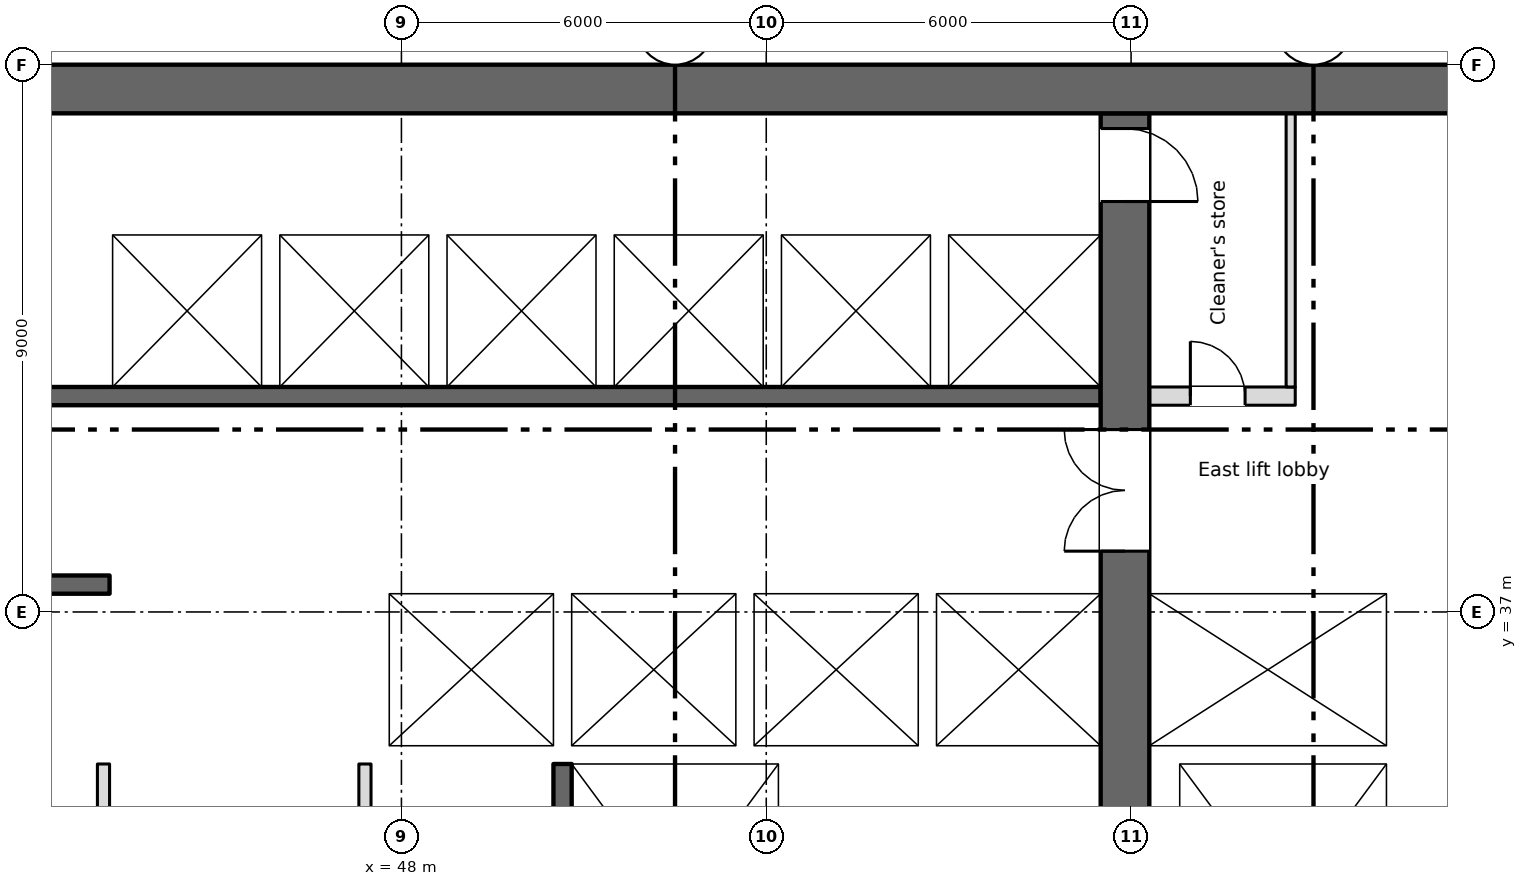
"""IFC4 building model, lengths in metres.
Left out: names, types, materials, properties, quantities, classifications, styles, units other than length and angle.
Written with IfcOpenShell. Run it as: python <this file> out.ifc"""

import sys

from ifc_helpers import new_model, si_unit, direction, frame, frame_2d, origin, place, context, subcontext, project, spatial, rectangle, extrude, element, fill, save


model = new_model("IFC4")
c1 = context("Model", 3, precision=1e-05, world=origin(), true_north=direction((0.0, 1.0)))
c2 = subcontext(c1, "Body", "Model", "MODEL_VIEW")
j1 = project(units=[si_unit("LENGTHUNIT", "METRE"), si_unit("PLANEANGLEUNIT", "RADIAN")], contexts=[c1])
p1 = place(None, origin())
s1 = spatial("IfcSite", under=j1, at=p1, CompositionType="ELEMENT")
p2 = place(p1, origin())
s2 = spatial("IfcBuilding", under=s1, at=p2, CompositionType="ELEMENT")
p3 = place(p2, frame((0.0, 0.0, 155.0)))
s3 = spatial("IfcBuildingStorey", under=s2, at=p3, CompositionType="ELEMENT", Elevation=155.0)
p4 = place(p3, frame((5.55, 45.6, 0.0), z_axis=(0.0, 0.0, 1.0), x_axis=(1.0, 0.0, 0.0)))
e1 = element("IfcWall", 1, at=p4, inside=s3, PredefinedType="SHEAR", context=c2, shape_type="SweptSolid", body=[
    extrude(rectangle(XDim=60.9, YDim=0.8, at=frame_2d((30.45, 0.0))), origin(), (0.0, 0.0, 1.0), 3.15),
])
p5 = place(p4, frame((1.2, 0.0, 0.6)))
e2 = element("IfcOpeningElement", 2, at=p5, cuts=e1, PredefinedType="OPENING", context=c2, shape_type="SweptSolid", body=[
    extrude(rectangle(XDim=0.6, YDim=2.4, at=frame_2d((0.3, 1.2))), frame((0.0, 0.41, 0.0), z_axis=(0.0, -1.0, 0.0), x_axis=(1.0, 0.0, 0.0)), (0.0, 0.0, 1.0), 0.82),
])
p6 = place(p4, frame((7.2, 0.0, 0.6)))
e3 = element("IfcOpeningElement", 3, at=p6, cuts=e1, PredefinedType="OPENING", context=c2, shape_type="SweptSolid", body=[
    extrude(rectangle(XDim=0.6, YDim=2.4, at=frame_2d((0.3, 1.2))), frame((0.0, 0.41, 0.0), z_axis=(0.0, -1.0, 0.0), x_axis=(1.0, 0.0, 0.0)), (0.0, 0.0, 1.0), 0.82),
])
p7 = place(p3, frame((64.35, 34.8, 0.0), z_axis=(0.0, 0.0, 1.0), x_axis=(0.0, 1.0, 0.0)))
e4 = element("IfcWall", 4, at=p7, inside=s3, PredefinedType="SHEAR", context=c2, shape_type="SweptSolid", body=[
    extrude(rectangle(XDim=10.4, YDim=0.3, at=frame_2d((5.2, 0.0))), origin(), (0.0, 0.0, 1.0), 3.15),
])
p8 = place(p3, frame((59.9, 28.4, 0.0), z_axis=(0.0, 0.0, 1.0), x_axis=(0.0, 1.0, 0.0)))
e5 = element("IfcWall", 5, at=p8, inside=s3, PredefinedType="SHEAR", context=c2, shape_type="SweptSolid", body=[
    extrude(rectangle(XDim=16.8, YDim=0.8, at=frame_2d((8.4, 0.0))), origin(), (0.0, 0.0, 1.0), 3.15),
])
p9 = place(p8, frame((9.6, 0.0, 0.0)))
e6 = element("IfcOpeningElement", 6, at=p9, cuts=e5, PredefinedType="OPENING", context=c2, shape_type="SweptSolid", body=[
    extrude(rectangle(XDim=2.0, YDim=2.1, at=frame_2d((1.0, 1.05))), frame((0.0, 0.41, 0.0), z_axis=(0.0, -1.0, 0.0), x_axis=(1.0, 0.0, 0.0)), (0.0, 0.0, 1.0), 0.82),
])
p10 = place(p8, frame((15.35, 0.0, 0.0)))
e7 = element("IfcOpeningElement", 7, at=p10, cuts=e5, PredefinedType="OPENING", context=c2, shape_type="SweptSolid", body=[
    extrude(rectangle(XDim=1.2, YDim=2.1, at=frame_2d((0.6, 1.05))), frame((0.0, 0.41, 0.0), z_axis=(0.0, -1.0, 0.0), x_axis=(1.0, 0.0, 0.0)), (0.0, 0.0, 1.0), 0.82),
])
p11 = place(p3, frame((50.65, 34.5, 0.0), z_axis=(0.0, 0.0, 1.0), x_axis=(0.0, -1.0, 0.0)))
e8 = element("IfcWall", 8, at=p11, inside=s3, PredefinedType="SHEAR", context=c2, shape_type="SweptSolid", body=[
    extrude(rectangle(XDim=6.1, YDim=0.3, at=frame_2d((3.05, 0.0))), origin(), (0.0, 0.0, 1.0), 3.15),
])
p12 = place(p11, frame((4.95, 0.0, 0.0)))
e9 = element("IfcOpeningElement", 9, at=p12, cuts=e8, PredefinedType="OPENING", context=c2, shape_type="SweptSolid", body=[
    extrude(rectangle(XDim=1.1, YDim=2.1, at=frame_2d((0.55, 1.05))), frame((0.0, 0.16, 0.0), z_axis=(0.0, -1.0, 0.0), x_axis=(1.0, 0.0, 0.0)), (0.0, 0.0, 1.0), 0.32),
])
p13 = place(p3, frame((54.35, 28.4, 0.0), z_axis=(0.0, 0.0, 1.0), x_axis=(0.0, 1.0, 0.0)))
e10 = element("IfcWall", 10, at=p13, inside=s3, PredefinedType="SHEAR", context=c2, shape_type="SweptSolid", body=[
    extrude(rectangle(XDim=6.1, YDim=0.3, at=frame_2d((3.05, 0.0))), origin(), (0.0, 0.0, 1.0), 3.15),
])
p14 = place(p3, frame((60.55, 28.4, 0.0), z_axis=(0.0, 0.0, 1.0), x_axis=(0.0, 1.0, 0.0)))
e11 = element("IfcWall", 11, at=p14, inside=s3, PredefinedType="SHEAR", context=c2, shape_type="SweptSolid", body=[
    extrude(rectangle(XDim=6.1, YDim=0.5, at=frame_2d((3.05, 0.0))), origin(), (0.0, 0.0, 1.0), 3.15),
])
p15 = place(p3, frame((64.35, 28.4, 0.0), z_axis=(0.0, 0.0, 1.0), x_axis=(0.0, 1.0, 0.0)))
e12 = element("IfcWall", 12, at=p15, inside=s3, PredefinedType="SHEAR", context=c2, shape_type="SweptSolid", body=[
    extrude(rectangle(XDim=6.1, YDim=0.3, at=frame_2d((3.05, 0.0))), origin(), (0.0, 0.0, 1.0), 3.15),
])
p16 = place(p3, frame((34.8, 34.65, 0.0), z_axis=(0.0, 0.0, 1.0), x_axis=(1.0, 0.0, 0.0)))
e13 = element("IfcWall", 13, at=p16, inside=s3, PredefinedType="SHEAR", context=c2, shape_type="SweptSolid", body=[
    extrude(rectangle(XDim=8.4, YDim=0.3, at=frame_2d((4.2, 0.0))), origin(), (0.0, 0.0, 1.0), 3.15),
])
p17 = place(p3, frame((47.3, 34.65, 0.0), z_axis=(0.0, 0.0, 1.0), x_axis=(1.0, 0.0, 0.0)))
e14 = element("IfcWall", 14, at=p17, inside=s3, PredefinedType="SHEAR", context=c2, shape_type="SweptSolid", body=[
    extrude(rectangle(XDim=12.2, YDim=0.3, at=frame_2d((6.1, 0.0))), origin(), (0.0, 0.0, 1.0), 3.15),
])
p18 = place(p17, frame((1.3, 0.0, 0.0)))
e15 = element("IfcOpeningElement", 15, at=p18, cuts=e14, PredefinedType="OPENING", context=c2, shape_type="SweptSolid", body=[
    extrude(rectangle(XDim=1.1, YDim=2.1, at=frame_2d((0.55, 1.05))), frame((0.0, 0.16, 0.0), z_axis=(0.0, -1.0, 0.0), x_axis=(1.0, 0.0, 0.0)), (0.0, 0.0, 1.0), 0.32),
])
p19 = place(p3, frame((60.3, 34.65, 0.0), z_axis=(0.0, 0.0, 1.0), x_axis=(1.0, 0.0, 0.0)))
e16 = element("IfcWall", 16, at=p19, inside=s3, PredefinedType="SHEAR", context=c2, shape_type="SweptSolid", body=[
    extrude(rectangle(XDim=4.2, YDim=0.3, at=frame_2d((2.1, 0.0))), origin(), (0.0, 0.0, 1.0), 3.15),
])
p20 = place(p3, frame((43.2, 37.45, 0.0), z_axis=(0.0, 0.0, 1.0), x_axis=(-1.0, 0.0, 0.0)))
e17 = element("IfcWall", 17, at=p20, inside=s3, PredefinedType="SHEAR", context=c2, shape_type="SweptSolid", body=[
    extrude(rectangle(XDim=8.4, YDim=0.3, at=frame_2d((4.2, 0.0))), origin(), (0.0, 0.0, 1.0), 3.15),
])
p21 = place(p20, frame((3.75, 0.0, 0.0)))
e18 = element("IfcOpeningElement", 18, at=p21, cuts=e17, PredefinedType="OPENING", context=c2, shape_type="SweptSolid", body=[
    extrude(rectangle(XDim=0.9, YDim=2.1, at=frame_2d((0.45, 1.05))), frame((0.0, 0.16, 0.0), z_axis=(0.0, -1.0, 0.0), x_axis=(1.0, 0.0, 0.0)), (0.0, 0.0, 1.0), 0.32),
])
p22 = place(p3, frame((47.3, 37.45, 0.0), z_axis=(0.0, 0.0, 1.0), x_axis=(1.0, 0.0, 0.0)))
e19 = element("IfcWall", 19, at=p22, inside=s3, PredefinedType="SHEAR", context=c2, shape_type="SweptSolid", body=[
    extrude(rectangle(XDim=12.2, YDim=0.3, at=frame_2d((6.1, 0.0))), origin(), (0.0, 0.0, 1.0), 3.15),
])
p23 = place(p22, frame((4.3, 0.0, 0.0)))
e20 = element("IfcOpeningElement", 20, at=p23, cuts=e19, PredefinedType="OPENING", context=c2, shape_type="SweptSolid", body=[
    extrude(rectangle(XDim=1.1, YDim=2.1, at=frame_2d((0.55, 1.05))), frame((0.0, 0.16, 0.0), z_axis=(0.0, -1.0, 0.0), x_axis=(1.0, 0.0, 0.0)), (0.0, 0.0, 1.0), 0.32),
])
p24 = place(p22, frame((7.3, 0.0, 0.0)))
e21 = element("IfcOpeningElement", 21, at=p24, cuts=e19, PredefinedType="OPENING", context=c2, shape_type="SweptSolid", body=[
    extrude(rectangle(XDim=1.1, YDim=2.1, at=frame_2d((0.55, 1.05))), frame((0.0, 0.16, 0.0), z_axis=(0.0, -1.0, 0.0), x_axis=(1.0, 0.0, 0.0)), (0.0, 0.0, 1.0), 0.32),
])
p25 = place(p22, frame((10.3, 0.0, 0.0)))
e22 = element("IfcOpeningElement", 22, at=p25, cuts=e19, PredefinedType="OPENING", context=c2, shape_type="SweptSolid", body=[
    extrude(rectangle(XDim=1.1, YDim=2.1, at=frame_2d((0.55, 1.05))), frame((0.0, 0.16, 0.0), z_axis=(0.0, -1.0, 0.0), x_axis=(1.0, 0.0, 0.0)), (0.0, 0.0, 1.0), 0.32),
])
p26 = place(p3, frame((60.3, 37.45, 0.0), z_axis=(0.0, 0.0, 1.0), x_axis=(1.0, 0.0, 0.0)))
e23 = element("IfcWall", 23, at=p26, inside=s3, PredefinedType="SHEAR", context=c2, shape_type="SweptSolid", body=[
    extrude(rectangle(XDim=3.9, YDim=0.3, at=frame_2d((1.95, 0.0))), origin(), (0.0, 0.0, 1.0), 3.15),
])
p27 = place(p26, frame((1.4, 0.0, 0.0)))
e24 = element("IfcOpeningElement", 24, at=p27, cuts=e23, PredefinedType="OPENING", context=c2, shape_type="SweptSolid", body=[
    extrude(rectangle(XDim=1.1, YDim=2.1, at=frame_2d((0.55, 1.05))), frame((0.0, 0.16, 0.0), z_axis=(0.0, -1.0, 0.0), x_axis=(1.0, 0.0, 0.0)), (0.0, 0.0, 1.0), 0.32),
])
p28 = place(p3, frame((43.05, 34.8, 0.0), z_axis=(0.0, 0.0, 1.0), x_axis=(0.0, 1.0, 0.0)))
e25 = element("IfcWall", 25, at=p28, inside=s3, PredefinedType="SHEAR", context=c2, shape_type="SweptSolid", body=[
    extrude(rectangle(XDim=2.5, YDim=0.3, at=frame_2d((1.25, 0.0))), origin(), (0.0, 0.0, 1.0), 3.15),
])
p29 = place(p3, frame((47.55, 34.8, 0.0), z_axis=(0.0, 0.0, 1.0), x_axis=(0.0, 1.0, 0.0)))
e26 = element("IfcWall", 26, at=p29, inside=s3, PredefinedType="SHEAR", context=c2, shape_type="SweptSolid", body=[
    extrude(rectangle(XDim=2.5, YDim=0.5, at=frame_2d((1.25, 0.0))), origin(), (0.0, 0.0, 1.0), 3.15),
])
p30 = place(p3, frame((50.65, 34.8, 0.0), z_axis=(0.0, 0.0, 1.0), x_axis=(0.0, 1.0, 0.0)))
e27 = element("IfcWall", 27, at=p30, inside=s3, PredefinedType="SHEAR", context=c2, shape_type="SweptSolid", body=[
    extrude(rectangle(XDim=2.5, YDim=0.3, at=frame_2d((1.25, 0.0))), origin(), (0.0, 0.0, 1.0), 3.15),
])
p31 = place(p3, frame((18.5, 40.55, 0.0), z_axis=(0.0, 0.0, 1.0), x_axis=(1.0, 0.0, 0.0)))
e28 = element("IfcWall", 28, at=p31, inside=s3, PredefinedType="SHEAR", context=c2, shape_type="SweptSolid", body=[
    extrude(rectangle(XDim=41.0, YDim=0.3, at=frame_2d((20.5, 0.0))), origin(), (0.0, 0.0, 1.0), 3.15),
])
p32 = place(p31, frame((15.9, 0.0, 0.0)))
e29 = element("IfcOpeningElement", 29, at=p32, cuts=e28, PredefinedType="OPENING", context=c2, shape_type="SweptSolid", body=[
    extrude(rectangle(XDim=0.9, YDim=2.1, at=frame_2d((0.45, 1.05))), frame((0.0, 0.16, 0.0), z_axis=(0.0, -1.0, 0.0), x_axis=(1.0, 0.0, 0.0)), (0.0, 0.0, 1.0), 0.32),
])
p33 = place(p31, frame((21.4, 0.0, 0.0)))
e30 = element("IfcOpeningElement", 30, at=p33, cuts=e28, PredefinedType="OPENING", context=c2, shape_type="SweptSolid", body=[
    extrude(rectangle(XDim=0.9, YDim=2.1, at=frame_2d((0.45, 1.05))), frame((0.0, 0.16, 0.0), z_axis=(0.0, -1.0, 0.0), x_axis=(1.0, 0.0, 0.0)), (0.0, 0.0, 1.0), 0.32),
])
p34 = place(p31, frame((6.175, 0.0, 0.0)))
e31 = element("IfcOpeningElement", 31, at=p34, cuts=e28, PredefinedType="OPENING", context=c2, shape_type="SweptSolid", body=[
    extrude(rectangle(XDim=1.1, YDim=2.1, at=frame_2d((0.55, 1.05))), frame((0.0, 0.16, 0.0), z_axis=(0.0, -1.0, 0.0), x_axis=(1.0, 0.0, 0.0)), (0.0, 0.0, 1.0), 0.32),
])
p35 = place(p31, frame((8.925, 0.0, 0.0)))
e32 = element("IfcOpeningElement", 32, at=p35, cuts=e28, PredefinedType="OPENING", context=c2, shape_type="SweptSolid", body=[
    extrude(rectangle(XDim=1.1, YDim=2.1, at=frame_2d((0.55, 1.05))), frame((0.0, 0.16, 0.0), z_axis=(0.0, -1.0, 0.0), x_axis=(1.0, 0.0, 0.0)), (0.0, 0.0, 1.0), 0.32),
])
p36 = place(p31, frame((11.675, 0.0, 0.0)))
e33 = element("IfcOpeningElement", 33, at=p36, cuts=e28, PredefinedType="OPENING", context=c2, shape_type="SweptSolid", body=[
    extrude(rectangle(XDim=1.1, YDim=2.1, at=frame_2d((0.55, 1.05))), frame((0.0, 0.16, 0.0), z_axis=(0.0, -1.0, 0.0), x_axis=(1.0, 0.0, 0.0)), (0.0, 0.0, 1.0), 0.32),
])
p37 = place(p31, frame((30.925, 0.0, 0.0)))
e34 = element("IfcOpeningElement", 34, at=p37, cuts=e28, PredefinedType="OPENING", context=c2, shape_type="SweptSolid", body=[
    extrude(rectangle(XDim=1.1, YDim=2.1, at=frame_2d((0.55, 1.05))), frame((0.0, 0.16, 0.0), z_axis=(0.0, -1.0, 0.0), x_axis=(1.0, 0.0, 0.0)), (0.0, 0.0, 1.0), 0.32),
])
p38 = place(p31, frame((33.675, 0.0, 0.0)))
e35 = element("IfcOpeningElement", 35, at=p38, cuts=e28, PredefinedType="OPENING", context=c2, shape_type="SweptSolid", body=[
    extrude(rectangle(XDim=1.1, YDim=2.1, at=frame_2d((0.55, 1.05))), frame((0.0, 0.16, 0.0), z_axis=(0.0, -1.0, 0.0), x_axis=(1.0, 0.0, 0.0)), (0.0, 0.0, 1.0), 0.32),
])
p39 = place(p31, frame((36.375, 0.0, 0.0)))
e36 = element("IfcOpeningElement", 36, at=p39, cuts=e28, PredefinedType="OPENING", context=c2, shape_type="SweptSolid", body=[
    extrude(rectangle(XDim=1.2, YDim=2.1, at=frame_2d((0.6, 1.05))), frame((0.0, 0.16, 0.0), z_axis=(0.0, -1.0, 0.0), x_axis=(1.0, 0.0, 0.0)), (0.0, 0.0, 1.0), 0.32),
])
p40 = place(p31, frame((39.15, 0.0, 0.0)))
e37 = element("IfcOpeningElement", 37, at=p40, cuts=e28, PredefinedType="OPENING", context=c2, shape_type="SweptSolid", body=[
    extrude(rectangle(XDim=1.2, YDim=2.1, at=frame_2d((0.6, 1.05))), frame((0.0, 0.16, 0.0), z_axis=(0.0, -1.0, 0.0), x_axis=(1.0, 0.0, 0.0)), (0.0, 0.0, 1.0), 0.32),
])
p41 = place(p3, frame((18.5, 43.35, 0.0), z_axis=(0.0, 0.0, 1.0), x_axis=(1.0, 0.0, 0.0)))
e38 = element("IfcWall", 38, at=p41, inside=s3, PredefinedType="SHEAR", context=c2, shape_type="SweptSolid", body=[
    extrude(rectangle(XDim=41.0, YDim=0.3, at=frame_2d((20.5, 0.0))), origin(), (0.0, 0.0, 1.0), 3.15),
])
p42 = place(p3, frame((60.3, 40.55, 0.0), z_axis=(0.0, 0.0, 1.0), x_axis=(1.0, 0.0, 0.0)))
e39 = element("IfcWall", 39, at=p42, inside=s3, PredefinedType="PARTITIONING", context=c2, shape_type="SweptSolid", body=[
    extrude(rectangle(XDim=2.4, YDim=0.3, at=frame_2d((1.2, 0.0))), origin(), (0.0, 0.0, 1.0), 3.15),
])
p43 = place(p42, frame((0.675, 0.0, 0.0)))
e40 = element("IfcOpeningElement", 40, at=p43, cuts=e39, PredefinedType="OPENING", context=c2, shape_type="SweptSolid", body=[
    extrude(rectangle(XDim=0.9, YDim=2.1, at=frame_2d((0.45, 1.05))), frame((0.0, 0.16, 0.0), z_axis=(0.0, -1.0, 0.0), x_axis=(1.0, 0.0, 0.0)), (0.0, 0.0, 1.0), 0.32),
])
for number, where, z_axis, x_axis in (
    (41, (53.65, 34.8, 0.0), (0.0, 0.0, 1.0), (0.0, 1.0, 0.0)),
    (42, (56.65, 34.8, 0.0), (0.0, 0.0, 1.0), (0.0, 1.0, 0.0)),
    (43, (43.1, 40.7, 0.0), (0.0, 0.0, 1.0), (0.0, 1.0, 0.0)),
    (44, (45.85, 40.7, 0.0), (0.0, 0.0, 1.0), (0.0, 1.0, 0.0)),
    (45, (48.6, 40.7, 0.0), (0.0, 0.0, 1.0), (0.0, 1.0, 0.0)),
    (46, (51.35, 40.7, 0.0), (0.0, 0.0, 1.0), (0.0, 1.0, 0.0)),
    (47, (54.1, 40.7, 0.0), (0.0, 0.0, 1.0), (0.0, 1.0, 0.0)),
    (48, (56.85, 40.7, 0.0), (0.0, 0.0, 1.0), (0.0, 1.0, 0.0)),
):
    element("IfcWall", number, at=place(p3, frame(where, z_axis=z_axis, x_axis=x_axis)), inside=s3, PredefinedType="SHEAR", context=c2, shape_type="SweptSolid", body=[
        extrude(rectangle(XDim=2.5, YDim=0.3, at=frame_2d((1.25, 0.0))), origin(), (0.0, 0.0, 1.0), 3.15),
    ])
for number, where, z_axis, x_axis in (
    (49, (43.1, 28.4, 0.0), (0.0, 0.0, 1.0), (0.0, 1.0, 0.0)),
    (50, (47.4, 28.4, 0.0), (0.0, 0.0, 1.0), (0.0, 1.0, 0.0)),
):
    element("IfcWall", number, at=place(p3, frame(where, z_axis=z_axis, x_axis=x_axis)), inside=s3, PredefinedType="PARTITIONING", context=c2, shape_type="SweptSolid", body=[
        extrude(rectangle(XDim=6.1, YDim=0.2, at=frame_2d((3.05, 0.0))), origin(), (0.0, 0.0, 1.0), 3.15),
    ])
p44 = place(p3, frame((62.625, 40.7, 0.0), z_axis=(0.0, 0.0, 1.0), x_axis=(0.0, 1.0, 0.0)))
e51 = element("IfcWall", 51, at=p44, inside=s3, PredefinedType="PARTITIONING", context=c2, shape_type="SweptSolid", body=[
    extrude(rectangle(XDim=4.5, YDim=0.15, at=frame_2d((2.25, 0.0))), origin(), (0.0, 0.0, 1.0), 3.15),
])
p45 = place(p43, origin())
e52 = element("IfcDoor", 52, at=p45, inside=s3, OperationType="SINGLE_SWING_LEFT", PredefinedType="DOOR", context=c2, shape_type="SweptSolid", body=[
    extrude(rectangle(XDim=0.9, YDim=2.1, at=frame_2d((0.45, 1.05))), frame((0.0, 0.025, 0.0), z_axis=(0.0, -1.0, 0.0), x_axis=(1.0, 0.0, 0.0)), (0.0, 0.0, 1.0), 0.05),
])
fill(e40, e52)
p46 = place(p23, origin())
e53 = element("IfcDoor", 53, at=p46, inside=s3, OperationType="SLIDING_TO_LEFT", PredefinedType="DOOR", context=c2, shape_type="SweptSolid", body=[
    extrude(rectangle(XDim=1.1, YDim=2.1, at=frame_2d((0.55, 1.05))), frame((0.0, 0.025, 0.0), z_axis=(0.0, -1.0, 0.0), x_axis=(1.0, 0.0, 0.0)), (0.0, 0.0, 1.0), 0.05),
])
fill(e20, e53)
p47 = place(p24, origin())
e54 = element("IfcDoor", 54, at=p47, inside=s3, OperationType="SLIDING_TO_LEFT", PredefinedType="DOOR", context=c2, shape_type="SweptSolid", body=[
    extrude(rectangle(XDim=1.1, YDim=2.1, at=frame_2d((0.55, 1.05))), frame((0.0, 0.025, 0.0), z_axis=(0.0, -1.0, 0.0), x_axis=(1.0, 0.0, 0.0)), (0.0, 0.0, 1.0), 0.05),
])
fill(e21, e54)
p48 = place(p25, origin())
e55 = element("IfcDoor", 55, at=p48, inside=s3, OperationType="SLIDING_TO_LEFT", PredefinedType="DOOR", context=c2, shape_type="SweptSolid", body=[
    extrude(rectangle(XDim=1.1, YDim=2.1, at=frame_2d((0.55, 1.05))), frame((0.0, 0.025, 0.0), z_axis=(0.0, -1.0, 0.0), x_axis=(1.0, 0.0, 0.0)), (0.0, 0.0, 1.0), 0.05),
])
fill(e22, e55)
p49 = place(p37, origin())
e56 = element("IfcDoor", 56, at=p49, inside=s3, OperationType="SLIDING_TO_LEFT", PredefinedType="DOOR", context=c2, shape_type="SweptSolid", body=[
    extrude(rectangle(XDim=1.1, YDim=2.1, at=frame_2d((0.55, 1.05))), frame((0.0, 0.025, 0.0), z_axis=(0.0, -1.0, 0.0), x_axis=(1.0, 0.0, 0.0)), (0.0, 0.0, 1.0), 0.05),
])
fill(e34, e56)
p50 = place(p38, origin())
e57 = element("IfcDoor", 57, at=p50, inside=s3, OperationType="SLIDING_TO_LEFT", PredefinedType="DOOR", context=c2, shape_type="SweptSolid", body=[
    extrude(rectangle(XDim=1.1, YDim=2.1, at=frame_2d((0.55, 1.05))), frame((0.0, 0.025, 0.0), z_axis=(0.0, -1.0, 0.0), x_axis=(1.0, 0.0, 0.0)), (0.0, 0.0, 1.0), 0.05),
])
fill(e35, e57)
p51 = place(p39, origin())
e58 = element("IfcDoor", 58, at=p51, inside=s3, OperationType="SLIDING_TO_LEFT", PredefinedType="DOOR", context=c2, shape_type="SweptSolid", body=[
    extrude(rectangle(XDim=1.2, YDim=2.1, at=frame_2d((0.6, 1.05))), frame((0.0, 0.025, 0.0), z_axis=(0.0, -1.0, 0.0), x_axis=(1.0, 0.0, 0.0)), (0.0, 0.0, 1.0), 0.05),
])
fill(e36, e58)
p52 = place(p40, origin())
e59 = element("IfcDoor", 59, at=p52, inside=s3, OperationType="SLIDING_TO_LEFT", PredefinedType="DOOR", context=c2, shape_type="SweptSolid", body=[
    extrude(rectangle(XDim=1.2, YDim=2.1, at=frame_2d((0.6, 1.05))), frame((0.0, 0.025, 0.0), z_axis=(0.0, -1.0, 0.0), x_axis=(1.0, 0.0, 0.0)), (0.0, 0.0, 1.0), 0.05),
])
fill(e37, e59)
p53 = place(p27, origin())
e60 = element("IfcDoor", 60, at=p53, inside=s3, OperationType="SLIDING_TO_LEFT", PredefinedType="DOOR", context=c2, shape_type="SweptSolid", body=[
    extrude(rectangle(XDim=1.1, YDim=2.1, at=frame_2d((0.55, 1.05))), frame((0.0, 0.025, 0.0), z_axis=(0.0, -1.0, 0.0), x_axis=(1.0, 0.0, 0.0)), (0.0, 0.0, 1.0), 0.05),
])
fill(e24, e60)
p54 = place(p18, origin())
e61 = element("IfcDoor", 61, at=p54, inside=s3, OperationType="SLIDING_TO_LEFT", PredefinedType="DOOR", context=c2, shape_type="SweptSolid", body=[
    extrude(rectangle(XDim=1.1, YDim=2.1, at=frame_2d((0.55, 1.05))), frame((0.0, 0.025, 0.0), z_axis=(0.0, -1.0, 0.0), x_axis=(1.0, 0.0, 0.0)), (0.0, 0.0, 1.0), 0.05),
])
fill(e15, e61)
p55 = place(p9, origin())
e62 = element("IfcDoor", 62, at=p55, inside=s3, OperationType="DOUBLE_DOOR_SINGLE_SWING", PredefinedType="DOOR", context=c2, shape_type="SweptSolid", body=[
    extrude(rectangle(XDim=2.0, YDim=2.1, at=frame_2d((1.0, 1.05))), frame((0.0, 0.025, 0.0), z_axis=(0.0, -1.0, 0.0), x_axis=(1.0, 0.0, 0.0)), (0.0, 0.0, 1.0), 0.05),
])
fill(e6, e62)
p56 = place(p10, origin())
e63 = element("IfcDoor", 63, at=p56, inside=s3, OperationType="SINGLE_SWING_LEFT", PredefinedType="DOOR", context=c2, shape_type="SweptSolid", body=[
    extrude(rectangle(XDim=1.2, YDim=2.1, at=frame_2d((0.6, 1.05))), frame((0.0, 0.025, 0.0), z_axis=(0.0, -1.0, 0.0), x_axis=(1.0, 0.0, 0.0)), (0.0, 0.0, 1.0), 0.05),
])
fill(e7, e63)
save(model, sys.argv[1])
